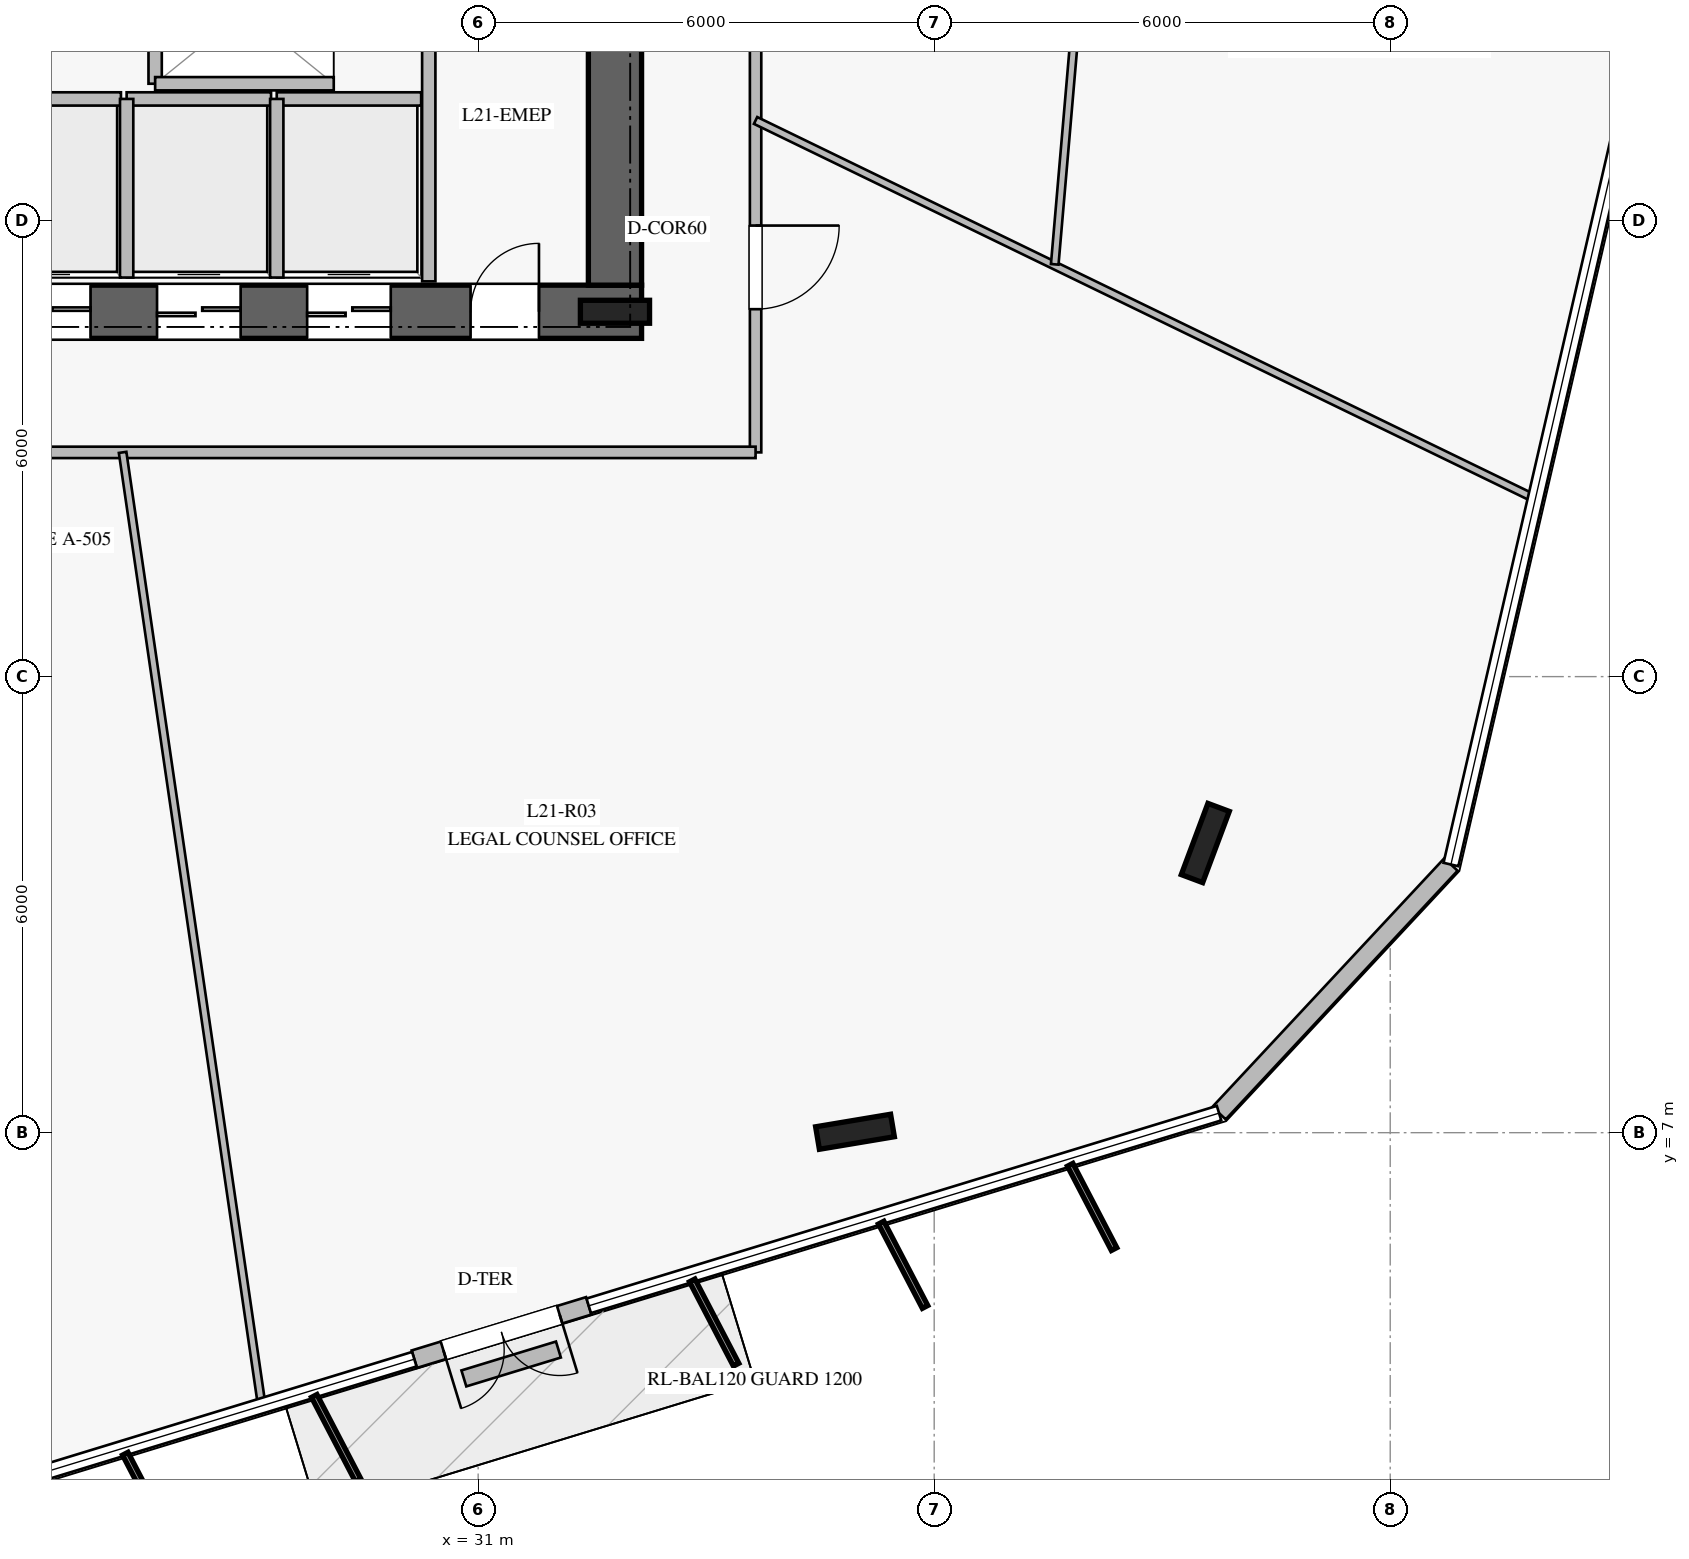
"""IFC4 building model, lengths in metres.
Left out: names, types, materials, properties, quantities, classifications, styles, units other than length and angle.
Written with IfcOpenShell. Run it as: python <this file> out.ifc"""

import sys

from ifc_helpers import new_model, si_unit, direction, frame, frame_2d, origin, origin_2d, place, context, subcontext, project, spatial, rectangle, i_section, extrude, element, fill, save


model = new_model("IFC4")
c1 = context("Model", 3, precision=1e-05, world=origin(), true_north=direction((0.0, 1.0)))
c2 = subcontext(c1, "Body", "Model", "MODEL_VIEW")
j1 = project(units=[si_unit("LENGTHUNIT", "METRE"), si_unit("PLANEANGLEUNIT", "RADIAN")], contexts=[c1])
p1 = place(None, origin())
s1 = spatial("IfcSite", under=j1, at=p1, CompositionType="ELEMENT")
p2 = place(p1, origin())
s2 = spatial("IfcBuilding", under=s1, at=p2, CompositionType="ELEMENT")
p3 = place(p2, frame((0.0, 0.0, 88.0)))
s3 = spatial("IfcBuildingStorey", under=s2, at=p3, CompositionType="ELEMENT", Elevation=88.0)
p4 = place(p3, frame((16.85, 17.8, 0.0), z_axis=(0.0, 0.0, 1.0), x_axis=(1.0, 0.0, 0.0)))
e1 = element("IfcWall", 1, at=p4, inside=s3, PredefinedType="SHEAR", context=c2, shape_type="SweptSolid", body=[
    extrude(rectangle(XDim=16.3, YDim=0.7, at=frame_2d((8.15, 0.0))), origin(), (0.0, 0.0, 1.0), 3.7),
])
p5 = place(p4, frame((5.1, 0.0, 0.0)))
e2 = element("IfcOpeningElement", 2, at=p5, cuts=e1, PredefinedType="OPENING", context=c2, shape_type="SweptSolid", body=[
    extrude(rectangle(XDim=1.2, YDim=2.25, at=frame_2d((0.6, 1.125))), frame((0.0, 0.36, 0.0), z_axis=(0.0, -1.0, 0.0), x_axis=(1.0, 0.0, 0.0)), (0.0, 0.0, 1.0), 0.72),
])
p6 = place(p4, frame((14.05, 0.0, 0.0)))
e3 = element("IfcOpeningElement", 3, at=p6, cuts=e1, PredefinedType="OPENING", context=c2, shape_type="SweptSolid", body=[
    extrude(rectangle(XDim=0.9, YDim=2.1, at=frame_2d((0.45, 1.05))), frame((0.0, 0.36, 0.0), z_axis=(0.0, -1.0, 0.0), x_axis=(1.0, 0.0, 0.0)), (0.0, 0.0, 1.0), 0.72),
])
p7 = place(p4, frame((7.95, 0.0, 0.0)))
e4 = element("IfcOpeningElement", 4, at=p7, cuts=e1, PredefinedType="OPENING", context=c2, shape_type="SweptSolid", body=[
    extrude(rectangle(XDim=1.1, YDim=2.2, at=frame_2d((0.55, 1.1))), frame((0.0, 0.36, 0.0), z_axis=(0.0, -1.0, 0.0), x_axis=(1.0, 0.0, 0.0)), (0.0, 0.0, 1.0), 0.72),
])
p8 = place(p4, frame((9.925, 0.0, 0.0)))
e5 = element("IfcOpeningElement", 5, at=p8, cuts=e1, PredefinedType="OPENING", context=c2, shape_type="SweptSolid", body=[
    extrude(rectangle(XDim=1.1, YDim=2.2, at=frame_2d((0.55, 1.1))), frame((0.0, 0.36, 0.0), z_axis=(0.0, -1.0, 0.0), x_axis=(1.0, 0.0, 0.0)), (0.0, 0.0, 1.0), 0.72),
])
p9 = place(p4, frame((11.9, 0.0, 0.0)))
e6 = element("IfcOpeningElement", 6, at=p9, cuts=e1, PredefinedType="OPENING", context=c2, shape_type="SweptSolid", body=[
    extrude(rectangle(XDim=1.1, YDim=2.2, at=frame_2d((0.55, 1.1))), frame((0.0, 0.36, 0.0), z_axis=(0.0, -1.0, 0.0), x_axis=(1.0, 0.0, 0.0)), (0.0, 0.0, 1.0), 0.72),
])
p10 = place(p3, frame((32.8, 18.15, 0.0), z_axis=(0.0, 0.0, 1.0), x_axis=(0.0, 1.0, 0.0)))
e7 = element("IfcWall", 7, at=p10, inside=s3, PredefinedType="SHEAR", context=c2, shape_type="SweptSolid", body=[
    extrude(rectangle(XDim=13.7, YDim=0.7, at=frame_2d((6.85, 0.0))), origin(), (0.0, 0.0, 1.0), 3.7),
])
p11 = place(p3, frame((32.8, 17.8, 0.0), z_axis=(0.0, 0.0, 1.0), x_axis=(1.0, 0.0, 0.0)))
e8 = element("IfcColumn", 8, at=p11, inside=s3, PredefinedType="COLUMN", context=c2, shape_type="SweptSolid", body=[
    extrude(i_section(OverallWidth=0.302, OverallDepth=0.91, WebThickness=0.021, FlangeThickness=0.04, at=origin_2d()), origin(), (0.0, 0.0, 1.0), 4.0),
])
for number, where, z_axis, x_axis in (
    (9, (35.958, 7.012, 0.0), (0.0, 0.0, 1.0), (0.986, 0.165, 0.0)),
    (10, (40.567, 10.811, 0.0), (0.0, 0.0, 1.0), (0.35, 0.937, 0.0)),
):
    element("IfcColumn", number, at=place(p3, frame(where, z_axis=z_axis, x_axis=x_axis)), inside=s3, PredefinedType="COLUMN", context=c2, shape_type="SweptSolid", body=[
        extrude(i_section(OverallWidth=0.3, OverallDepth=1.0, WebThickness=0.019, FlangeThickness=0.036, at=origin_2d()), origin(), (0.0, 0.0, 1.0), 4.0),
    ])
p12 = place(p3, frame((30.16, 4.02, 0.0), z_axis=(0.0, 0.0, 1.0), x_axis=(0.956281264577, 0.292448530546, 0.0)))
e11 = element("IfcWall", 11, at=p12, inside=s3, PredefinedType="STANDARD", context=c2, shape_type="SweptSolid", body=[
    extrude(rectangle(XDim=2.4, YDim=0.24, at=frame_2d((1.2, 0.0))), origin(), (0.0, 0.0, 1.0), 3.7),
])
p13 = place(p12, frame((0.4, 0.0, 0.0)))
e12 = element("IfcOpeningElement", 12, at=p13, cuts=e11, PredefinedType="OPENING", context=c2, shape_type="SweptSolid", body=[
    extrude(rectangle(XDim=1.6, YDim=2.25, at=frame_2d((0.8, 1.125))), frame((0.0, 0.13, 0.0), z_axis=(0.0, -1.0, 0.0), x_axis=(1.0, 0.0, 0.0)), (0.0, 0.0, 1.0), 0.26),
])
p14 = place(p3, frame((40.748, 7.257, 0.0), z_axis=(0.0, 0.0, 1.0), x_axis=(0.682090691133, 0.731267590606, 0.0)))
e13 = element("IfcWall", 13, at=p14, inside=s3, PredefinedType="STANDARD", context=c2, shape_type="SweptSolid", body=[
    extrude(rectangle(XDim=4.473, YDim=0.24, at=frame_2d((2.237, 0.0))), origin(), (0.0, 0.0, 1.0), 3.7),
])
p15 = place(p3, frame((30.812, 3.767, 0.0), z_axis=(0.0, 0.0, 1.0), x_axis=(0.956393819486, 0.292080232212, 0.0)))
e14 = element("IfcWall", 14, at=p15, inside=s3, PredefinedType="USERDEFINED", context=c2, shape_type="SweptSolid", body=[
    extrude(rectangle(XDim=1.301, YDim=0.22, at=frame_2d((0.65, 0.0))), origin(), (0.0, 0.0, 1.0), 0.4),
])
p16 = place(p3, frame((30.35, 18.2, 0.0), z_axis=(0.0, 0.0, 1.0), x_axis=(0.0, 1.0, 0.0)))
e15 = element("IfcWall", 15, at=p16, inside=s3, PredefinedType="PARTITIONING", context=c2, shape_type="SweptSolid", body=[
    extrude(rectangle(XDim=3.48, YDim=0.175, at=frame_2d((1.74, 0.0))), origin(), (0.0, 0.0, 1.0), 3.7),
])
p17 = place(p3, frame((24.4, 20.6, 0.0), z_axis=(0.0, 0.0, 1.0), x_axis=(1.0, 0.0, 0.0)))
e16 = element("IfcWall", 16, at=p17, inside=s3, PredefinedType="PARTITIONING", context=c2, shape_type="SweptSolid", body=[
    extrude(rectangle(XDim=1.9, YDim=0.175, at=frame_2d((0.95, 0.0))), origin(), (0.0, 0.0, 1.0), 3.7),
])
p18 = place(p3, frame((26.375, 20.6, 0.0), z_axis=(0.0, 0.0, 1.0), x_axis=(1.0, 0.0, 0.0)))
e17 = element("IfcWall", 17, at=p18, inside=s3, PredefinedType="PARTITIONING", context=c2, shape_type="SweptSolid", body=[
    extrude(rectangle(XDim=1.9, YDim=0.175, at=frame_2d((0.95, 0.0))), origin(), (0.0, 0.0, 1.0), 3.7),
])
p19 = place(p3, frame((26.375, 18.25, 0.0), z_axis=(0.0, 0.0, 1.0), x_axis=(0.0, 1.0, 0.0)))
e18 = element("IfcWall", 18, at=p19, inside=s3, PredefinedType="PARTITIONING", context=c2, shape_type="SweptSolid", body=[
    extrude(rectangle(XDim=2.35, YDim=0.175, at=frame_2d((1.175, 0.0))), origin(), (0.0, 0.0, 1.0), 3.7),
])
p20 = place(p3, frame((28.35, 20.6, 0.0), z_axis=(0.0, 0.0, 1.0), x_axis=(1.0, 0.0, 0.0)))
e19 = element("IfcWall", 19, at=p20, inside=s3, PredefinedType="PARTITIONING", context=c2, shape_type="SweptSolid", body=[
    extrude(rectangle(XDim=1.9, YDim=0.175, at=frame_2d((0.95, 0.0))), origin(), (0.0, 0.0, 1.0), 3.7),
])
p21 = place(p3, frame((28.35, 18.25, 0.0), z_axis=(0.0, 0.0, 1.0), x_axis=(0.0, 1.0, 0.0)))
e20 = element("IfcWall", 20, at=p21, inside=s3, PredefinedType="PARTITIONING", context=c2, shape_type="SweptSolid", body=[
    extrude(rectangle(XDim=2.35, YDim=0.175, at=frame_2d((1.175, 0.0))), origin(), (0.0, 0.0, 1.0), 3.7),
])
p22 = place(p3, frame((26.75, 20.8, 0.0), z_axis=(0.0, 0.0, 1.0), x_axis=(0.0, 1.0, 0.0)))
e21 = element("IfcWall", 21, at=p22, inside=s3, PredefinedType="PARTITIONING", context=c2, shape_type="SweptSolid", body=[
    extrude(rectangle(XDim=1.9, YDim=0.175, at=frame_2d((0.95, 0.0))), origin(), (0.0, 0.0, 1.0), 3.7),
])
p23 = place(p3, frame((26.75, 20.8, 0.0), z_axis=(0.0, 0.0, 1.0), x_axis=(1.0, 0.0, 0.0)))
e22 = element("IfcWall", 22, at=p23, inside=s3, PredefinedType="PARTITIONING", context=c2, shape_type="SweptSolid", body=[
    extrude(rectangle(XDim=2.35, YDim=0.175, at=frame_2d((1.175, 0.0))), origin(), (0.0, 0.0, 1.0), 3.7),
])
p24 = place(p3, frame((34.65, 34.05, 0.0), z_axis=(0.0, 0.0, 1.0), x_axis=(0.0, -1.0, 0.0)))
e23 = element("IfcWall", 23, at=p24, inside=s3, PredefinedType="PARTITIONING", context=c2, shape_type="SweptSolid", body=[
    extrude(rectangle(XDim=18.1, YDim=0.15, at=frame_2d((9.05, 0.0))), origin(), (0.0, 0.0, 1.0), 3.15),
])
p25 = place(p24, frame((15.116, 0.0, 0.0)))
e24 = element("IfcOpeningElement", 24, at=p25, cuts=e23, PredefinedType="OPENING", context=c2, shape_type="SweptSolid", body=[
    extrude(rectangle(XDim=1.1, YDim=2.2, at=frame_2d((0.55, 1.1))), frame((0.0, 0.085, 0.0), z_axis=(0.0, -1.0, 0.0), x_axis=(1.0, 0.0, 0.0)), (0.0, 0.0, 1.0), 0.17),
])
p26 = place(p24, frame((9.862, 0.0, 0.0)))
e25 = element("IfcOpeningElement", 25, at=p26, cuts=e23, PredefinedType="OPENING", context=c2, shape_type="SweptSolid", body=[
    extrude(rectangle(XDim=1.1, YDim=2.2, at=frame_2d((0.55, 1.1))), frame((0.0, 0.085, 0.0), z_axis=(0.0, -1.0, 0.0), x_axis=(1.0, 0.0, 0.0)), (0.0, 0.0, 1.0), 0.17),
])
p27 = place(p24, frame((3.162, 0.0, 0.0)))
e26 = element("IfcOpeningElement", 26, at=p27, cuts=e23, PredefinedType="OPENING", context=c2, shape_type="SweptSolid", body=[
    extrude(rectangle(XDim=1.1, YDim=2.2, at=frame_2d((0.55, 1.1))), frame((0.0, 0.085, 0.0), z_axis=(0.0, -1.0, 0.0), x_axis=(1.0, 0.0, 0.0)), (0.0, 0.0, 1.0), 0.17),
])
p28 = place(p3, frame((34.65, 15.95, 0.0), z_axis=(0.0, 0.0, 1.0), x_axis=(-1.0, 0.0, 0.0)))
e27 = element("IfcWall", 27, at=p28, inside=s3, PredefinedType="PARTITIONING", context=c2, shape_type="SweptSolid", body=[
    extrude(rectangle(XDim=19.3, YDim=0.15, at=frame_2d((9.65, 0.0))), origin(), (0.0, 0.0, 1.0), 3.15),
])
p29 = place(p28, frame((12.608, 0.0, 0.0)))
e28 = element("IfcOpeningElement", 28, at=p29, cuts=e27, PredefinedType="OPENING", context=c2, shape_type="SweptSolid", body=[
    extrude(rectangle(XDim=1.1, YDim=2.2, at=frame_2d((0.55, 1.1))), frame((0.0, 0.085, 0.0), z_axis=(0.0, -1.0, 0.0), x_axis=(1.0, 0.0, 0.0)), (0.0, 0.0, 1.0), 0.17),
])
p30 = place(p3, frame((26.322, 15.95, 0.0), z_axis=(0.0, 0.0, 1.0), x_axis=(0.144474493425, -0.989508524849, 0.0)))
e29 = element("IfcWall", 29, at=p30, inside=s3, PredefinedType="MOVABLE", context=c2, shape_type="SweptSolid", body=[
    extrude(rectangle(XDim=12.659, YDim=0.1, at=frame_2d((6.329, 0.0))), origin(), (0.0, 0.0, 1.0), 3.0),
])
p31 = place(p3, frame((34.65, 20.317, 0.0), z_axis=(0.0, 0.0, 1.0), x_axis=(0.89965666283, -0.436598086374, 0.0)))
e30 = element("IfcWall", 30, at=p31, inside=s3, PredefinedType="MOVABLE", context=c2, shape_type="SweptSolid", body=[
    extrude(rectangle(XDim=11.386, YDim=0.1, at=frame_2d((5.693, 0.0))), origin(), (0.0, 0.0, 1.0), 3.0),
])
p32 = place(p3, frame((38.586, 18.424, 0.0), z_axis=(0.0, 0.0, 1.0), x_axis=(0.085869529315, 0.996306390592, 0.0)))
e31 = element("IfcWall", 31, at=p32, inside=s3, PredefinedType="MOVABLE", context=c2, shape_type="SweptSolid", body=[
    extrude(rectangle(XDim=9.55, YDim=0.1, at=frame_2d((4.775, 0.0))), origin(), (0.0, 0.0, 1.0), 3.7),
])
p33 = place(p32, frame((4.275, 0.0, 0.0)))
e32 = element("IfcOpeningElement", 32, at=p33, cuts=e31, PredefinedType="OPENING", context=c2, shape_type="SweptSolid", body=[
    extrude(rectangle(XDim=1.0, YDim=2.15, at=frame_2d((0.5, 1.075))), frame((0.0, 0.06, 0.0), z_axis=(0.0, -1.0, 0.0), x_axis=(1.0, 0.0, 0.0)), (0.0, 0.0, 1.0), 0.12),
])
p34 = place(p13, frame((1.6, 0.0, 0.0), z_axis=(0.0, 0.0, 1.0), x_axis=(-1.0, 0.0, 0.0)))
e33 = element("IfcDoor", 33, at=p34, inside=s3, OperationType="DOUBLE_DOOR_SINGLE_SWING", PredefinedType="DOOR", context=c2, shape_type="SweptSolid", body=[
    extrude(rectangle(XDim=1.6, YDim=2.25, at=frame_2d((0.8, 1.125))), frame((0.0, 0.025, 0.0), z_axis=(0.0, -1.0, 0.0), x_axis=(1.0, 0.0, 0.0)), (0.0, 0.0, 1.0), 0.05),
])
fill(e12, e33)
p35 = place(p6, origin())
e34 = element("IfcDoor", 34, at=p35, inside=s3, OperationType="SINGLE_SWING_RIGHT", PredefinedType="DOOR", context=c2, shape_type="SweptSolid", body=[
    extrude(rectangle(XDim=0.9, YDim=2.1, at=frame_2d((0.45, 1.05))), frame((0.0, 0.025, 0.0), z_axis=(0.0, -1.0, 0.0), x_axis=(1.0, 0.0, 0.0)), (0.0, 0.0, 1.0), 0.05),
])
fill(e3, e34)
p36 = place(p7, origin())
e35 = element("IfcDoor", 35, at=p36, inside=s3, OperationType="DOUBLE_DOOR_SLIDING", PredefinedType="DOOR", context=c2, shape_type="SweptSolid", body=[
    extrude(rectangle(XDim=1.1, YDim=2.2, at=frame_2d((0.55, 1.1))), frame((0.0, 0.025, 0.0), z_axis=(0.0, -1.0, 0.0), x_axis=(1.0, 0.0, 0.0)), (0.0, 0.0, 1.0), 0.05),
])
fill(e4, e35)
p37 = place(p8, origin())
e36 = element("IfcDoor", 36, at=p37, inside=s3, OperationType="DOUBLE_DOOR_SLIDING", PredefinedType="DOOR", context=c2, shape_type="SweptSolid", body=[
    extrude(rectangle(XDim=1.1, YDim=2.2, at=frame_2d((0.55, 1.1))), frame((0.0, 0.025, 0.0), z_axis=(0.0, -1.0, 0.0), x_axis=(1.0, 0.0, 0.0)), (0.0, 0.0, 1.0), 0.05),
])
fill(e5, e36)
p38 = place(p9, origin())
e37 = element("IfcDoor", 37, at=p38, inside=s3, OperationType="DOUBLE_DOOR_SLIDING", PredefinedType="DOOR", context=c2, shape_type="SweptSolid", body=[
    extrude(rectangle(XDim=1.1, YDim=2.2, at=frame_2d((0.55, 1.1))), frame((0.0, 0.025, 0.0), z_axis=(0.0, -1.0, 0.0), x_axis=(1.0, 0.0, 0.0)), (0.0, 0.0, 1.0), 0.05),
])
fill(e6, e37)
p39 = place(p25, origin())
e38 = element("IfcDoor", 38, at=p39, inside=s3, OperationType="SINGLE_SWING_LEFT", PredefinedType="DOOR", context=c2, shape_type="SweptSolid", body=[
    extrude(rectangle(XDim=1.1, YDim=2.2, at=frame_2d((0.55, 1.1))), frame((0.0, 0.025, 0.0), z_axis=(0.0, -1.0, 0.0), x_axis=(1.0, 0.0, 0.0)), (0.0, 0.0, 1.0), 0.05),
])
fill(e24, e38)
save(model, sys.argv[1])
